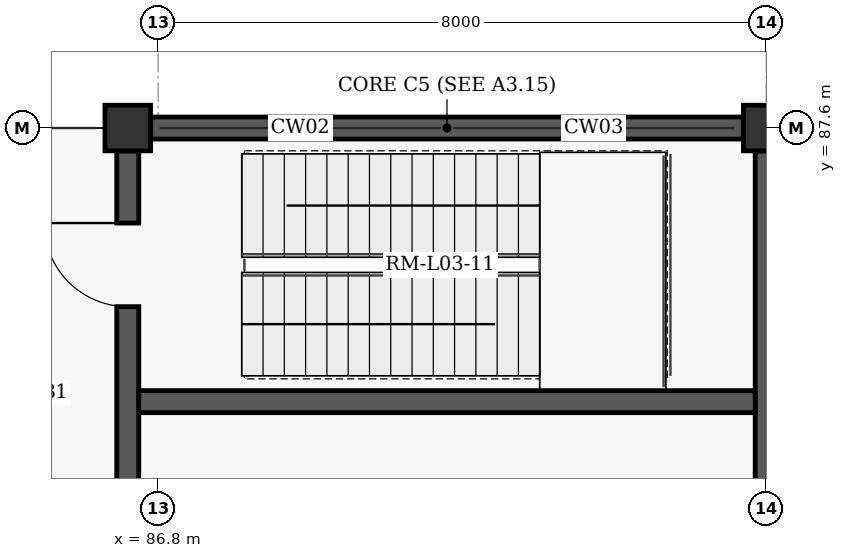
"""IFC4 building model, lengths in metres.
Left out: names, types, materials, properties, quantities, classifications, styles, units other than length and angle.
Written with IfcOpenShell. Run it as: python <this file> out.ifc"""

import sys

from ifc_helpers import new_model, si_unit, direction, frame, frame_2d, origin, origin_2d, place, context, subcontext, project, spatial, rectangle, extrude, element, fill, save


model = new_model("IFC4")
c1 = context("Model", 3, precision=1e-05, world=origin(), true_north=direction((0.0, 1.0)))
c2 = subcontext(c1, "Body", "Model", "MODEL_VIEW")
j1 = project(units=[si_unit("LENGTHUNIT", "METRE"), si_unit("PLANEANGLEUNIT", "RADIAN")], contexts=[c1])
p1 = place(None, origin())
s1 = spatial("IfcSite", under=j1, at=p1, CompositionType="ELEMENT")
p2 = place(p1, origin())
s2 = spatial("IfcBuilding", under=s1, at=p2, CompositionType="ELEMENT")
p3 = place(p2, frame((0.0, 0.0, 15.6)))
s3 = spatial("IfcBuildingStorey", under=s2, at=p3, CompositionType="ELEMENT", Elevation=15.6)
for number, where, z_axis, x_axis in (
    (1, (86.4, 87.6, 0.0), (0.0, 0.0, 1.0), (1.0, 0.0, 0.0)),
    (2, (94.8, 87.6, 0.0), (0.0, 0.0, 1.0), (1.0, 0.0, 0.0)),
):
    element("IfcColumn", number, at=place(p3, frame(where, z_axis=z_axis, x_axis=x_axis)), inside=s3, PredefinedType="COLUMN", context=c2, shape_type="SweptSolid", body=[
        extrude(rectangle(XDim=0.6, YDim=0.6, at=origin_2d()), origin(), (0.0, 0.0, 1.0), 4.8),
    ])
p4 = place(p3, frame((86.702, 87.6, 0.0), z_axis=(0.0, 0.0, 1.0), x_axis=(1.0, 0.0, 0.0)))
e3 = element("IfcWall", 3, at=p4, inside=s3, PredefinedType="SHEAR", context=c2, shape_type="SweptSolid", body=[
    extrude(rectangle(XDim=7.796, YDim=0.29, at=frame_2d((3.898, 0.0))), origin(), (0.0, 0.0, 1.0), 4.58),
])
p5 = place(p3, frame((86.4, 79.902, 0.0), z_axis=(0.0, 0.0, 1.0), x_axis=(0.0, 1.0, 0.0)))
e4 = element("IfcWall", 4, at=p5, inside=s3, PredefinedType="SHEAR", context=c2, shape_type="SweptSolid", body=[
    extrude(rectangle(XDim=7.396, YDim=0.29, at=frame_2d((3.698, 0.0))), origin(), (0.0, 0.0, 1.0), 4.58),
])
p6 = place(p5, frame((5.348, 0.0, 0.0)))
e5 = element("IfcOpeningElement", 5, at=p6, cuts=e4, PredefinedType="OPENING", context=c2, shape_type="SweptSolid", body=[
    extrude(rectangle(XDim=1.1, YDim=2.15, at=frame_2d((0.55, 1.075))), frame((0.0, 0.155, 0.0), z_axis=(0.0, -1.0, 0.0), x_axis=(1.0, 0.0, 0.0)), (0.0, 0.0, 1.0), 0.31),
])
p7 = place(p5, frame((1.323, 0.0, 0.0)))
e6 = element("IfcOpeningElement", 6, at=p7, cuts=e4, PredefinedType="OPENING", context=c2, shape_type="SweptSolid", body=[
    extrude(rectangle(XDim=1.15, YDim=2.2, at=frame_2d((0.575, 1.1))), frame((0.0, 0.155, 0.0), z_axis=(0.0, -1.0, 0.0), x_axis=(1.0, 0.0, 0.0)), (0.0, 0.0, 1.0), 0.31),
])
p8 = place(p3, frame((94.8, 79.902, 0.0), z_axis=(0.0, 0.0, 1.0), x_axis=(0.0, 1.0, 0.0)))
e7 = element("IfcWall", 7, at=p8, inside=s3, PredefinedType="SHEAR", context=c2, shape_type="SweptSolid", body=[
    extrude(rectangle(XDim=7.396, YDim=0.29, at=frame_2d((3.698, 0.0))), origin(), (0.0, 0.0, 1.0), 4.58),
])
p9 = place(p3, frame((86.545, 84.0, 0.0), z_axis=(0.0, 0.0, 1.0), x_axis=(1.0, 0.0, 0.0)))
e8 = element("IfcWall", 8, at=p9, inside=s3, PredefinedType="SHEAR", context=c2, shape_type="SweptSolid", body=[
    extrude(rectangle(XDim=8.11, YDim=0.29, at=frame_2d((4.055, 0.0))), origin(), (0.0, 0.0, 1.0), 4.58),
])
p10 = place(p6, origin())
e9 = element("IfcDoor", 9, at=p10, inside=s3, OperationType="SINGLE_SWING_RIGHT", PredefinedType="DOOR", context=c2, shape_type="SweptSolid", body=[
    extrude(rectangle(XDim=1.1, YDim=2.15, at=frame_2d((0.55, 1.075))), frame((0.0, 0.025, 0.0), z_axis=(0.0, -1.0, 0.0), x_axis=(1.0, 0.0, 0.0)), (0.0, 0.0, 1.0), 0.05),
])
fill(e5, e9)
save(model, sys.argv[1])
